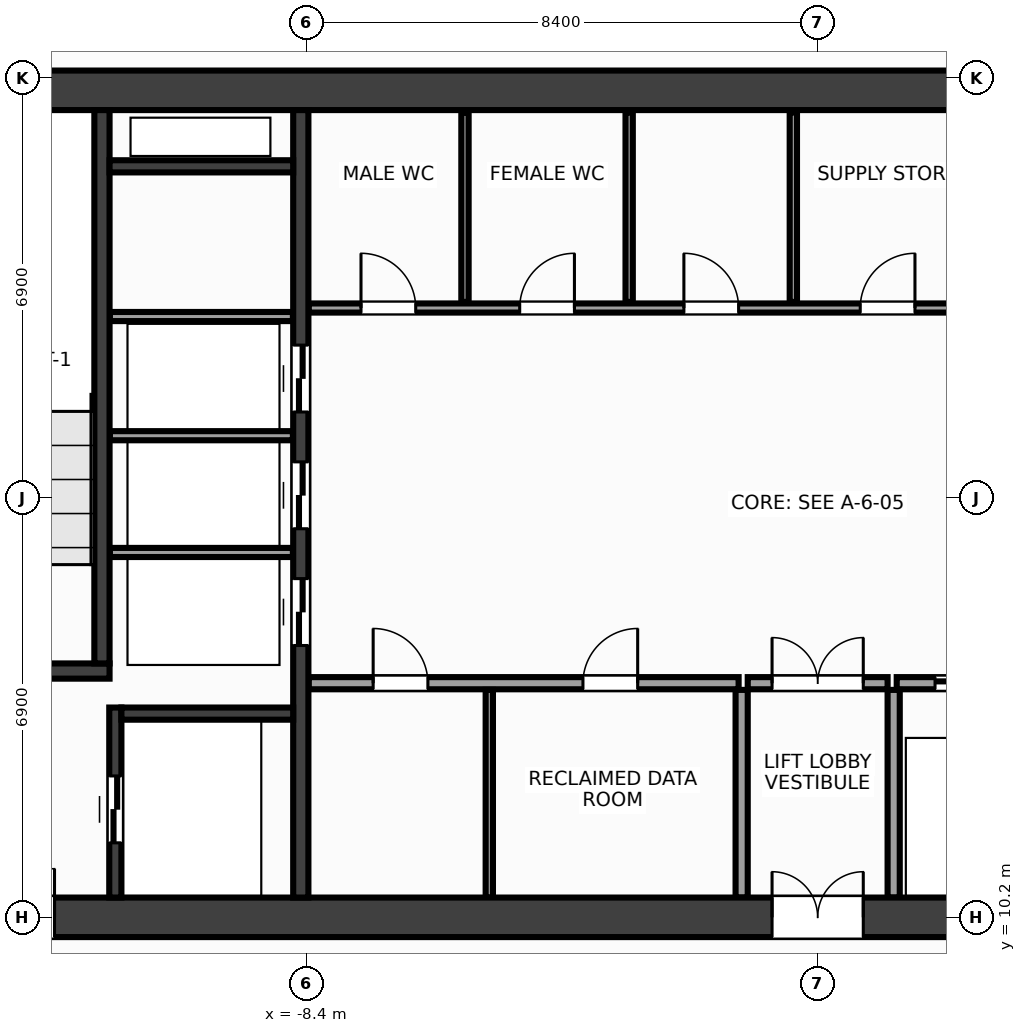
"""IFC4 building model, lengths in metres.
Left out: names, types, materials, properties, quantities, classifications, styles, units other than length and angle.
Written with IfcOpenShell. Run it as: python <this file> out.ifc"""

import sys

from ifc_helpers import new_model, si_unit, direction, frame, frame_2d, origin, place, context, subcontext, project, spatial, rectangle, extrude, source, transform, mapped, element, fill, save


model = new_model("IFC4")
c1 = context("Model", 3, precision=1e-05, world=origin(), true_north=direction((0.0, 1.0)))
c2 = subcontext(c1, "Body", "Model", "MODEL_VIEW")
j1 = project(units=[si_unit("LENGTHUNIT", "METRE"), si_unit("PLANEANGLEUNIT", "RADIAN")], contexts=[c1])
p1 = place(None, origin())
s1 = spatial("IfcSite", under=j1, at=p1, CompositionType="ELEMENT")
p2 = place(p1, origin())
s2 = spatial("IfcBuilding", under=s1, at=p2, CompositionType="ELEMENT")
p3 = place(p2, frame((0.0, 0.0, 185.6)))
s3 = spatial("IfcBuildingStorey", under=s2, at=p3, CompositionType="ELEMENT", Elevation=185.6)
m1 = source(origin(), c2, "Body", "SweptSolid", [
    extrude(rectangle(XDim=31.85, YDim=0.65, at=frame_2d((15.925, 0.0))), origin(), (0.0, 0.0, 1.0), 3.6),
])
p4 = place(p3, frame((-15.925, 23.8, 0.0), z_axis=(0.0, 0.0, 1.0), x_axis=(1.0, 0.0, 0.0)))
e1 = element("IfcWall", 1, at=p4, inside=s3, PredefinedType="SHEAR", context=c2, shape_type="MappedRepresentation", body=[
    mapped(m1, transform((0.0, 0.0, 0.0), x_axis=(1.0, 0.0, 0.0), y_axis=(0.0, 1.0, 0.0), z_axis=(0.0, 0.0, 1.0), scale=1.0)),
])
p5 = place(p3, frame((-15.925, 10.2, 0.0), z_axis=(0.0, 0.0, 1.0), x_axis=(1.0, 0.0, 0.0)))
e2 = element("IfcWall", 2, at=p5, inside=s3, PredefinedType="SHEAR", context=c2, shape_type="MappedRepresentation", body=[
    mapped(m1, transform((0.0, 0.0, 0.0), x_axis=(1.0, 0.0, 0.0), y_axis=(0.0, 1.0, 0.0), z_axis=(0.0, 0.0, 1.0), scale=1.0)),
])
p6 = place(p5, frame((1.775, 0.0, 0.0)))
e3 = element("IfcOpeningElement", 3, at=p6, cuts=e2, PredefinedType="OPENING", context=c2, shape_type="SweptSolid", body=[
    extrude(rectangle(XDim=1.6, YDim=2.15, at=frame_2d((0.8, 1.075))), frame((0.0, 0.337, 0.0), z_axis=(0.0, -1.0, 0.0), x_axis=(1.0, 0.0, 0.0)), (0.0, 0.0, 1.0), 0.674),
])
p7 = place(p5, frame((28.475, 0.0, 0.0)))
e4 = element("IfcOpeningElement", 4, at=p7, cuts=e2, PredefinedType="OPENING", context=c2, shape_type="SweptSolid", body=[
    extrude(rectangle(XDim=1.6, YDim=2.15, at=frame_2d((0.8, 1.075))), frame((0.0, 0.337, 0.0), z_axis=(0.0, -1.0, 0.0), x_axis=(1.0, 0.0, 0.0)), (0.0, 0.0, 1.0), 0.674),
])
p8 = place(p5, frame((15.175, 0.0, 0.0)))
e5 = element("IfcOpeningElement", 5, at=p8, cuts=e2, PredefinedType="OPENING", context=c2, shape_type="SweptSolid", body=[
    extrude(rectangle(XDim=1.5, YDim=2.2, at=frame_2d((0.75, 1.1))), frame((0.0, 0.337, 0.0), z_axis=(0.0, -1.0, 0.0), x_axis=(1.0, 0.0, 0.0)), (0.0, 0.0, 1.0), 0.674),
])
m2 = source(origin(), c2, "Body", "SweptSolid", [
    extrude(rectangle(XDim=12.95, YDim=0.25, at=frame_2d((6.475, 0.0))), origin(), (0.0, 0.0, 1.0), 3.6),
])
p9 = place(p3, frame((-8.5, 10.525, 0.0), z_axis=(0.0, 0.0, 1.0), x_axis=(0.0, 1.0, 0.0)))
e6 = element("IfcWall", 6, at=p9, inside=s3, PredefinedType="SHEAR", context=c2, shape_type="MappedRepresentation", body=[
    mapped(m2, transform((0.0, 0.0, 0.0), x_axis=(1.0, 0.0, 0.0), y_axis=(0.0, 1.0, 0.0), z_axis=(0.0, 0.0, 1.0), scale=1.0)),
])
p10 = place(p9, frame((4.145, 0.0, 0.0)))
e7 = element("IfcOpeningElement", 7, at=p10, cuts=e6, PredefinedType="OPENING", context=c2, shape_type="SweptSolid", body=[
    extrude(rectangle(XDim=1.1, YDim=2.15, at=frame_2d((0.55, 1.075))), frame((0.0, 0.137, 0.0), z_axis=(0.0, -1.0, 0.0), x_axis=(1.0, 0.0, 0.0)), (0.0, 0.0, 1.0), 0.274),
])
p11 = place(p9, frame((6.065, 0.0, 0.0)))
e8 = element("IfcOpeningElement", 8, at=p11, cuts=e6, PredefinedType="OPENING", context=c2, shape_type="SweptSolid", body=[
    extrude(rectangle(XDim=1.1, YDim=2.15, at=frame_2d((0.55, 1.075))), frame((0.0, 0.137, 0.0), z_axis=(0.0, -1.0, 0.0), x_axis=(1.0, 0.0, 0.0)), (0.0, 0.0, 1.0), 0.274),
])
p12 = place(p9, frame((7.985, 0.0, 0.0)))
e9 = element("IfcOpeningElement", 9, at=p12, cuts=e6, PredefinedType="OPENING", context=c2, shape_type="SweptSolid", body=[
    extrude(rectangle(XDim=1.1, YDim=2.15, at=frame_2d((0.55, 1.075))), frame((0.0, 0.137, 0.0), z_axis=(0.0, -1.0, 0.0), x_axis=(1.0, 0.0, 0.0)), (0.0, 0.0, 1.0), 0.274),
])
m3 = source(origin(), c2, "Body", "SweptSolid", [
    extrude(rectangle(XDim=3.63, YDim=0.25, at=frame_2d((1.815, 0.0))), origin(), (0.0, 0.0, 1.0), 3.6),
])
p13 = place(p3, frame((-15.275, 14.25, 0.0), z_axis=(0.0, 0.0, 1.0), x_axis=(1.0, 0.0, 0.0)))
e10 = element("IfcWall", 10, at=p13, inside=s3, PredefinedType="SHEAR", context=c2, shape_type="MappedRepresentation", body=[
    mapped(m3, transform((0.0, 0.0, 0.0), x_axis=(1.0, 0.0, 0.0), y_axis=(0.0, 1.0, 0.0), z_axis=(0.0, 0.0, 1.0), scale=1.0)),
])
p14 = place(p13, frame((0.95, 0.0, 0.0)))
e11 = element("IfcOpeningElement", 11, at=p14, cuts=e10, PredefinedType="OPENING", context=c2, shape_type="SweptSolid", body=[
    extrude(rectangle(XDim=1.6, YDim=2.15, at=frame_2d((0.8, 1.075))), frame((0.0, 0.137, 0.0), z_axis=(0.0, -1.0, 0.0), x_axis=(1.0, 0.0, 0.0)), (0.0, 0.0, 1.0), 0.274),
])
m4 = source(origin(), c2, "Body", "SweptSolid", [
    extrude(rectangle(XDim=9.1, YDim=0.25, at=frame_2d((4.55, 0.0))), origin(), (0.0, 0.0, 1.0), 3.6),
])
p15 = place(p3, frame((-11.77, 14.375, 0.0), z_axis=(0.0, 0.0, 1.0), x_axis=(0.0, 1.0, 0.0)))
e12 = element("IfcWall", 12, at=p15, inside=s3, PredefinedType="SHEAR", context=c2, shape_type="MappedRepresentation", body=[
    mapped(m4, transform((0.0, 0.0, 0.0), x_axis=(1.0, 0.0, 0.0), y_axis=(0.0, 1.0, 0.0), z_axis=(0.0, 0.0, 1.0), scale=1.0)),
])
m5 = source(origin(), c2, "Body", "SweptSolid", [
    extrude(rectangle(XDim=3.125, YDim=0.2, at=frame_2d((1.562, 0.0))), origin(), (0.0, 0.0, 1.0), 3.6),
])
p16 = place(p3, frame((-11.55, 10.525, 0.0), z_axis=(0.0, 0.0, 1.0), x_axis=(0.0, 1.0, 0.0)))
e13 = element("IfcWall", 13, at=p16, inside=s3, PredefinedType="SHEAR", context=c2, shape_type="MappedRepresentation", body=[
    mapped(m5, transform((0.0, 0.0, 0.0), x_axis=(1.0, 0.0, 0.0), y_axis=(0.0, 1.0, 0.0), z_axis=(0.0, 0.0, 1.0), scale=1.0)),
])
p17 = place(p16, frame((0.9, 0.0, 0.0)))
e14 = element("IfcOpeningElement", 14, at=p17, cuts=e13, PredefinedType="OPENING", context=c2, shape_type="SweptSolid", body=[
    extrude(rectangle(XDim=1.1, YDim=2.15, at=frame_2d((0.55, 1.075))), frame((0.0, 0.112, 0.0), z_axis=(0.0, -1.0, 0.0), x_axis=(1.0, 0.0, 0.0)), (0.0, 0.0, 1.0), 0.224),
])
m6 = source(origin(), c2, "Body", "SweptSolid", [
    extrude(rectangle(XDim=2.825, YDim=0.2, at=frame_2d((1.413, 0.0))), origin(), (0.0, 0.0, 1.0), 3.6),
])
p18 = place(p3, frame((-11.45, 13.55, 0.0), z_axis=(0.0, 0.0, 1.0), x_axis=(1.0, 0.0, 0.0)))
e15 = element("IfcWall", 15, at=p18, inside=s3, PredefinedType="SHEAR", context=c2, shape_type="MappedRepresentation", body=[
    mapped(m6, transform((0.0, 0.0, 0.0), x_axis=(1.0, 0.0, 0.0), y_axis=(0.0, 1.0, 0.0), z_axis=(0.0, 0.0, 1.0), scale=1.0)),
])
m7 = source(origin(), c2, "Body", "SweptSolid", [
    extrude(rectangle(XDim=3.02, YDim=0.2, at=frame_2d((1.51, 0.0))), origin(), (0.0, 0.0, 1.0), 3.6),
])
p19 = place(p3, frame((-11.645, 22.55, 0.0), z_axis=(0.0, 0.0, 1.0), x_axis=(1.0, 0.0, 0.0)))
e16 = element("IfcWall", 16, at=p19, inside=s3, PredefinedType="SHEAR", context=c2, shape_type="MappedRepresentation", body=[
    mapped(m7, transform((0.0, 0.0, 0.0), x_axis=(1.0, 0.0, 0.0), y_axis=(0.0, 1.0, 0.0), z_axis=(0.0, 0.0, 1.0), scale=1.0)),
])
m8 = source(origin(), c2, "Body", "SweptSolid", [
    extrude(rectangle(XDim=3.01, YDim=0.15, at=frame_2d((1.505, 0.0))), origin(), (0.0, 0.0, 1.0), 3.3),
])
for number, where, z_axis, x_axis in (
    (17, (-11.64, 16.2, 0.0), (0.0, 0.0, 1.0), (1.0, 0.0, 0.0)),
    (18, (-11.64, 18.12, 0.0), (0.0, 0.0, 1.0), (1.0, 0.0, 0.0)),
    (19, (-11.64, 20.08, 0.0), (0.0, 0.0, 1.0), (1.0, 0.0, 0.0)),
):
    element("IfcWall", number, at=place(p3, frame(where, z_axis=z_axis, x_axis=x_axis)), inside=s3, PredefinedType="PARTITIONING", context=c2, shape_type="MappedRepresentation", body=[
        mapped(m8, transform((0.0, 0.0, 0.0), x_axis=(1.0, 0.0, 0.0), y_axis=(0.0, 1.0, 0.0), z_axis=(0.0, 0.0, 1.0), scale=1.0)),
    ])
m9 = source(origin(), c2, "Body", "SweptSolid", [
    extrude(rectangle(XDim=7.07, YDim=0.2, at=frame_2d((3.535, 0.0))), origin(), (0.0, 0.0, 1.0), 3.3),
])
p20 = place(p3, frame((-8.37, 14.05, 0.0), z_axis=(0.0, 0.0, 1.0), x_axis=(1.0, 0.0, 0.0)))
e20 = element("IfcWall", 20, at=p20, inside=s3, PredefinedType="PARTITIONING", context=c2, shape_type="MappedRepresentation", body=[
    mapped(m9, transform((0.0, 0.0, 0.0), x_axis=(1.0, 0.0, 0.0), y_axis=(0.0, 1.0, 0.0), z_axis=(0.0, 0.0, 1.0), scale=1.0)),
])
p21 = place(p20, frame((1.06, 0.0, 0.0)))
e21 = element("IfcOpeningElement", 21, at=p21, cuts=e20, PredefinedType="OPENING", context=c2, shape_type="SweptSolid", body=[
    extrude(rectangle(XDim=0.9, YDim=2.15, at=frame_2d((0.45, 1.075))), frame((0.0, 0.112, 0.0), z_axis=(0.0, -1.0, 0.0), x_axis=(1.0, 0.0, 0.0)), (0.0, 0.0, 1.0), 0.224),
])
p22 = place(p20, frame((4.51, 0.0, 0.0)))
e22 = element("IfcOpeningElement", 22, at=p22, cuts=e20, PredefinedType="OPENING", context=c2, shape_type="SweptSolid", body=[
    extrude(rectangle(XDim=0.9, YDim=2.15, at=frame_2d((0.45, 1.075))), frame((0.0, 0.112, 0.0), z_axis=(0.0, -1.0, 0.0), x_axis=(1.0, 0.0, 0.0)), (0.0, 0.0, 1.0), 0.224),
])
p23 = place(p3, frame((1.3, 14.05, 0.0), z_axis=(0.0, 0.0, 1.0), x_axis=(1.0, 0.0, 0.0)))
e23 = element("IfcWall", 23, at=p23, inside=s3, PredefinedType="PARTITIONING", context=c2, shape_type="MappedRepresentation", body=[
    mapped(m9, transform((0.0, 0.0, 0.0), x_axis=(1.0, 0.0, 0.0), y_axis=(0.0, 1.0, 0.0), z_axis=(0.0, 0.0, 1.0), scale=1.0)),
])
p24 = place(p23, frame((0.63, 0.0, 0.0)))
e24 = element("IfcOpeningElement", 24, at=p24, cuts=e23, PredefinedType="OPENING", context=c2, shape_type="SweptSolid", body=[
    extrude(rectangle(XDim=1.1, YDim=2.15, at=frame_2d((0.55, 1.075))), frame((0.0, 0.112, 0.0), z_axis=(0.0, -1.0, 0.0), x_axis=(1.0, 0.0, 0.0)), (0.0, 0.0, 1.0), 0.224),
])
p25 = place(p23, frame((2.98, 0.0, 0.0)))
e25 = element("IfcOpeningElement", 25, at=p25, cuts=e23, PredefinedType="OPENING", context=c2, shape_type="SweptSolid", body=[
    extrude(rectangle(XDim=1.1, YDim=2.15, at=frame_2d((0.55, 1.075))), frame((0.0, 0.112, 0.0), z_axis=(0.0, -1.0, 0.0), x_axis=(1.0, 0.0, 0.0)), (0.0, 0.0, 1.0), 0.224),
])
p26 = place(p23, frame((5.33, 0.0, 0.0)))
e26 = element("IfcOpeningElement", 26, at=p26, cuts=e23, PredefinedType="OPENING", context=c2, shape_type="SweptSolid", body=[
    extrude(rectangle(XDim=1.1, YDim=2.15, at=frame_2d((0.55, 1.075))), frame((0.0, 0.112, 0.0), z_axis=(0.0, -1.0, 0.0), x_axis=(1.0, 0.0, 0.0)), (0.0, 0.0, 1.0), 0.224),
])
m10 = source(origin(), c2, "Body", "SweptSolid", [
    extrude(rectangle(XDim=3.415, YDim=0.2, at=frame_2d((1.708, 0.0))), origin(), (0.0, 0.0, 1.0), 3.3),
])
for number, where, z_axis, x_axis in (
    (27, (-1.25, 10.525, 0.0), (0.0, 0.0, 1.0), (0.0, 1.0, 0.0)),
    (28, (1.25, 10.525, 0.0), (0.0, 0.0, 1.0), (0.0, 1.0, 0.0)),
):
    element("IfcWall", number, at=place(p3, frame(where, z_axis=z_axis, x_axis=x_axis)), inside=s3, PredefinedType="PARTITIONING", context=c2, shape_type="MappedRepresentation", body=[
        mapped(m10, transform((0.0, 0.0, 0.0), x_axis=(1.0, 0.0, 0.0), y_axis=(0.0, 1.0, 0.0), z_axis=(0.0, 0.0, 1.0), scale=1.0)),
    ])
m11 = source(origin(), c2, "Body", "SweptSolid", [
    extrude(rectangle(XDim=2.3, YDim=0.2, at=frame_2d((1.15, 0.0))), origin(), (0.0, 0.0, 1.0), 3.3),
])
p27 = place(p3, frame((-1.15, 14.05, 0.0), z_axis=(0.0, 0.0, 1.0), x_axis=(1.0, 0.0, 0.0)))
e29 = element("IfcWall", 29, at=p27, inside=s3, PredefinedType="PARTITIONING", context=c2, shape_type="MappedRepresentation", body=[
    mapped(m11, transform((0.0, 0.0, 0.0), x_axis=(1.0, 0.0, 0.0), y_axis=(0.0, 1.0, 0.0), z_axis=(0.0, 0.0, 1.0), scale=1.0)),
])
p28 = place(p27, frame((0.4, 0.0, 0.0)))
e30 = element("IfcOpeningElement", 30, at=p28, cuts=e29, PredefinedType="OPENING", context=c2, shape_type="SweptSolid", body=[
    extrude(rectangle(XDim=1.5, YDim=2.2, at=frame_2d((0.75, 1.1))), frame((0.0, 0.112, 0.0), z_axis=(0.0, -1.0, 0.0), x_axis=(1.0, 0.0, 0.0)), (0.0, 0.0, 1.0), 0.224),
])
m12 = source(origin(), c2, "Body", "SweptSolid", [
    extrude(rectangle(XDim=14.59, YDim=0.15, at=frame_2d((7.295, 0.0))), origin(), (0.0, 0.0, 1.0), 3.3),
])
p29 = place(p3, frame((-8.37, 20.22, 0.0), z_axis=(0.0, 0.0, 1.0), x_axis=(1.0, 0.0, 0.0)))
e31 = element("IfcWall", 31, at=p29, inside=s3, PredefinedType="PARTITIONING", context=c2, shape_type="MappedRepresentation", body=[
    mapped(m12, transform((0.0, 0.0, 0.0), x_axis=(1.0, 0.0, 0.0), y_axis=(0.0, 1.0, 0.0), z_axis=(0.0, 0.0, 1.0), scale=1.0)),
])
p30 = place(p29, frame((0.86, 0.0, 0.0)))
e32 = element("IfcOpeningElement", 32, at=p30, cuts=e31, PredefinedType="OPENING", context=c2, shape_type="SweptSolid", body=[
    extrude(rectangle(XDim=0.9, YDim=2.15, at=frame_2d((0.45, 1.075))), frame((0.0, 0.087, 0.0), z_axis=(0.0, -1.0, 0.0), x_axis=(1.0, 0.0, 0.0)), (0.0, 0.0, 1.0), 0.174),
])
p31 = place(p29, frame((3.47, 0.0, 0.0)))
e33 = element("IfcOpeningElement", 33, at=p31, cuts=e31, PredefinedType="OPENING", context=c2, shape_type="SweptSolid", body=[
    extrude(rectangle(XDim=0.9, YDim=2.15, at=frame_2d((0.45, 1.075))), frame((0.0, 0.087, 0.0), z_axis=(0.0, -1.0, 0.0), x_axis=(1.0, 0.0, 0.0)), (0.0, 0.0, 1.0), 0.174),
])
p32 = place(p29, frame((6.17, 0.0, 0.0)))
e34 = element("IfcOpeningElement", 34, at=p32, cuts=e31, PredefinedType="OPENING", context=c2, shape_type="SweptSolid", body=[
    extrude(rectangle(XDim=0.9, YDim=2.15, at=frame_2d((0.45, 1.075))), frame((0.0, 0.087, 0.0), z_axis=(0.0, -1.0, 0.0), x_axis=(1.0, 0.0, 0.0)), (0.0, 0.0, 1.0), 0.174),
])
p33 = place(p29, frame((9.07, 0.0, 0.0)))
e35 = element("IfcOpeningElement", 35, at=p33, cuts=e31, PredefinedType="OPENING", context=c2, shape_type="SweptSolid", body=[
    extrude(rectangle(XDim=0.9, YDim=2.15, at=frame_2d((0.45, 1.075))), frame((0.0, 0.087, 0.0), z_axis=(0.0, -1.0, 0.0), x_axis=(1.0, 0.0, 0.0)), (0.0, 0.0, 1.0), 0.174),
])
p34 = place(p29, frame((12.32, 0.0, 0.0)))
e36 = element("IfcOpeningElement", 36, at=p34, cuts=e31, PredefinedType="OPENING", context=c2, shape_type="SweptSolid", body=[
    extrude(rectangle(XDim=0.9, YDim=2.15, at=frame_2d((0.45, 1.075))), frame((0.0, 0.087, 0.0), z_axis=(0.0, -1.0, 0.0), x_axis=(1.0, 0.0, 0.0)), (0.0, 0.0, 1.0), 0.174),
])
m13 = source(origin(), c2, "Body", "SweptSolid", [
    extrude(rectangle(XDim=3.415, YDim=0.12, at=frame_2d((1.708, 0.0))), origin(), (0.0, 0.0, 1.0), 3.3),
])
p35 = place(p3, frame((-5.4, 10.525, 0.0), z_axis=(0.0, 0.0, 1.0), x_axis=(0.0, 1.0, 0.0)))
e37 = element("IfcWall", 37, at=p35, inside=s3, PredefinedType="PARTITIONING", context=c2, shape_type="MappedRepresentation", body=[
    mapped(m13, transform((0.0, 0.0, 0.0), x_axis=(1.0, 0.0, 0.0), y_axis=(0.0, 1.0, 0.0), z_axis=(0.0, 0.0, 1.0), scale=1.0)),
])
m14 = source(origin(), c2, "Body", "SweptSolid", [
    extrude(rectangle(XDim=3.115, YDim=0.12, at=frame_2d((1.558, 0.0))), origin(), (0.0, 0.0, 1.0), 3.3),
])
for number, where, z_axis, x_axis in (
    (38, (-5.8, 20.32, 0.0), (0.0, 0.0, 1.0), (0.0, 1.0, 0.0)),
    (39, (-3.1, 20.32, 0.0), (0.0, 0.0, 1.0), (0.0, 1.0, 0.0)),
    (40, (-0.4, 20.32, 0.0), (0.0, 0.0, 1.0), (0.0, 1.0, 0.0)),
):
    element("IfcWall", number, at=place(p3, frame(where, z_axis=z_axis, x_axis=x_axis)), inside=s3, PredefinedType="PARTITIONING", context=c2, shape_type="MappedRepresentation", body=[
        mapped(m14, transform((0.0, 0.0, 0.0), x_axis=(1.0, 0.0, 0.0), y_axis=(0.0, 1.0, 0.0), z_axis=(0.0, 0.0, 1.0), scale=1.0)),
    ])
m15 = source(origin(), c2, "Body", "SweptSolid", [
    extrude(rectangle(XDim=1.6, YDim=2.15, at=frame_2d((0.8, 1.075))), frame((0.0, 0.025, 0.0), z_axis=(0.0, -1.0, 0.0), x_axis=(1.0, 0.0, 0.0)), (0.0, 0.0, 1.0), 0.05),
])
p36 = place(p6, origin())
e41 = element("IfcDoor", 41, at=p36, inside=s3, OperationType="DOUBLE_DOOR_SINGLE_SWING", PredefinedType="DOOR", context=c2, shape_type="MappedRepresentation", body=[
    mapped(m15, transform((0.0, 0.0, 0.0), x_axis=(1.0, 0.0, 0.0), y_axis=(0.0, 1.0, 0.0), z_axis=(0.0, 0.0, 1.0), scale=1.0)),
])
fill(e3, e41)
m16 = source(origin(), c2, "Body", "SweptSolid", [
    extrude(rectangle(XDim=1.1, YDim=2.15, at=frame_2d((0.55, 1.075))), frame((0.0, 0.025, 0.0), z_axis=(0.0, -1.0, 0.0), x_axis=(1.0, 0.0, 0.0)), (0.0, 0.0, 1.0), 0.05),
])
p37 = place(p17, origin())
e42 = element("IfcDoor", 42, at=p37, inside=s3, OperationType="DOUBLE_DOOR_SLIDING", PredefinedType="DOOR", context=c2, shape_type="MappedRepresentation", body=[
    mapped(m16, transform((0.0, 0.0, 0.0), x_axis=(1.0, 0.0, 0.0), y_axis=(0.0, 1.0, 0.0), z_axis=(0.0, 0.0, 1.0), scale=1.0)),
])
fill(e14, e42)
p38 = place(p10, origin())
e43 = element("IfcDoor", 43, at=p38, inside=s3, OperationType="DOUBLE_DOOR_SLIDING", PredefinedType="DOOR", context=c2, shape_type="MappedRepresentation", body=[
    mapped(m16, transform((0.0, 0.0, 0.0), x_axis=(1.0, 0.0, 0.0), y_axis=(0.0, 1.0, 0.0), z_axis=(0.0, 0.0, 1.0), scale=1.0)),
])
fill(e7, e43)
p39 = place(p11, origin())
e44 = element("IfcDoor", 44, at=p39, inside=s3, OperationType="DOUBLE_DOOR_SLIDING", PredefinedType="DOOR", context=c2, shape_type="MappedRepresentation", body=[
    mapped(m16, transform((0.0, 0.0, 0.0), x_axis=(1.0, 0.0, 0.0), y_axis=(0.0, 1.0, 0.0), z_axis=(0.0, 0.0, 1.0), scale=1.0)),
])
fill(e8, e44)
p40 = place(p12, origin())
e45 = element("IfcDoor", 45, at=p40, inside=s3, OperationType="DOUBLE_DOOR_SLIDING", PredefinedType="DOOR", context=c2, shape_type="MappedRepresentation", body=[
    mapped(m16, transform((0.0, 0.0, 0.0), x_axis=(1.0, 0.0, 0.0), y_axis=(0.0, 1.0, 0.0), z_axis=(0.0, 0.0, 1.0), scale=1.0)),
])
fill(e9, e45)
m17 = source(origin(), c2, "Body", "SweptSolid", [
    extrude(rectangle(XDim=0.9, YDim=2.15, at=frame_2d((0.45, 1.075))), frame((0.0, 0.025, 0.0), z_axis=(0.0, -1.0, 0.0), x_axis=(1.0, 0.0, 0.0)), (0.0, 0.0, 1.0), 0.05),
])
p41 = place(p21, origin())
e46 = element("IfcDoor", 46, at=p41, inside=s3, OperationType="SINGLE_SWING_LEFT", PredefinedType="DOOR", context=c2, shape_type="MappedRepresentation", body=[
    mapped(m17, transform((0.0, 0.0, 0.0), x_axis=(1.0, 0.0, 0.0), y_axis=(0.0, 1.0, 0.0), z_axis=(0.0, 0.0, 1.0), scale=1.0)),
])
fill(e21, e46)
p42 = place(p22, origin())
e47 = element("IfcDoor", 47, at=p42, inside=s3, OperationType="SINGLE_SWING_RIGHT", PredefinedType="DOOR", context=c2, shape_type="MappedRepresentation", body=[
    mapped(m17, transform((0.0, 0.0, 0.0), x_axis=(1.0, 0.0, 0.0), y_axis=(0.0, 1.0, 0.0), z_axis=(0.0, 0.0, 1.0), scale=1.0)),
])
fill(e22, e47)
p43 = place(p24, origin())
e48 = element("IfcDoor", 48, at=p43, inside=s3, OperationType="DOUBLE_DOOR_SLIDING", PredefinedType="DOOR", context=c2, shape_type="MappedRepresentation", body=[
    mapped(m16, transform((0.0, 0.0, 0.0), x_axis=(1.0, 0.0, 0.0), y_axis=(0.0, 1.0, 0.0), z_axis=(0.0, 0.0, 1.0), scale=1.0)),
])
fill(e24, e48)
m18 = source(origin(), c2, "Body", "SweptSolid", [
    extrude(rectangle(XDim=1.5, YDim=2.2, at=frame_2d((0.75, 1.1))), frame((0.0, 0.025, 0.0), z_axis=(0.0, -1.0, 0.0), x_axis=(1.0, 0.0, 0.0)), (0.0, 0.0, 1.0), 0.05),
])
p44 = place(p28, origin())
e49 = element("IfcDoor", 49, at=p44, inside=s3, OperationType="DOUBLE_DOOR_SINGLE_SWING", PredefinedType="DOOR", context=c2, shape_type="MappedRepresentation", body=[
    mapped(m18, transform((0.0, 0.0, 0.0), x_axis=(1.0, 0.0, 0.0), y_axis=(0.0, 1.0, 0.0), z_axis=(0.0, 0.0, 1.0), scale=1.0)),
])
fill(e30, e49)
p45 = place(p8, origin())
e50 = element("IfcDoor", 50, at=p45, inside=s3, OperationType="DOUBLE_DOOR_SINGLE_SWING", PredefinedType="DOOR", context=c2, shape_type="MappedRepresentation", body=[
    mapped(m18, transform((0.0, 0.0, 0.0), x_axis=(1.0, 0.0, 0.0), y_axis=(0.0, 1.0, 0.0), z_axis=(0.0, 0.0, 1.0), scale=1.0)),
])
fill(e5, e50)
p46 = place(p30, origin())
e51 = element("IfcDoor", 51, at=p46, inside=s3, OperationType="SINGLE_SWING_LEFT", PredefinedType="DOOR", context=c2, shape_type="MappedRepresentation", body=[
    mapped(m17, transform((0.0, 0.0, 0.0), x_axis=(1.0, 0.0, 0.0), y_axis=(0.0, 1.0, 0.0), z_axis=(0.0, 0.0, 1.0), scale=1.0)),
])
fill(e32, e51)
p47 = place(p31, origin())
e52 = element("IfcDoor", 52, at=p47, inside=s3, OperationType="SINGLE_SWING_RIGHT", PredefinedType="DOOR", context=c2, shape_type="MappedRepresentation", body=[
    mapped(m17, transform((0.0, 0.0, 0.0), x_axis=(1.0, 0.0, 0.0), y_axis=(0.0, 1.0, 0.0), z_axis=(0.0, 0.0, 1.0), scale=1.0)),
])
fill(e33, e52)
p48 = place(p32, origin())
e53 = element("IfcDoor", 53, at=p48, inside=s3, OperationType="SINGLE_SWING_LEFT", PredefinedType="DOOR", context=c2, shape_type="MappedRepresentation", body=[
    mapped(m17, transform((0.0, 0.0, 0.0), x_axis=(1.0, 0.0, 0.0), y_axis=(0.0, 1.0, 0.0), z_axis=(0.0, 0.0, 1.0), scale=1.0)),
])
fill(e34, e53)
p49 = place(p33, origin())
e54 = element("IfcDoor", 54, at=p49, inside=s3, OperationType="SINGLE_SWING_RIGHT", PredefinedType="DOOR", context=c2, shape_type="MappedRepresentation", body=[
    mapped(m17, transform((0.0, 0.0, 0.0), x_axis=(1.0, 0.0, 0.0), y_axis=(0.0, 1.0, 0.0), z_axis=(0.0, 0.0, 1.0), scale=1.0)),
])
fill(e35, e54)
save(model, sys.argv[1])
